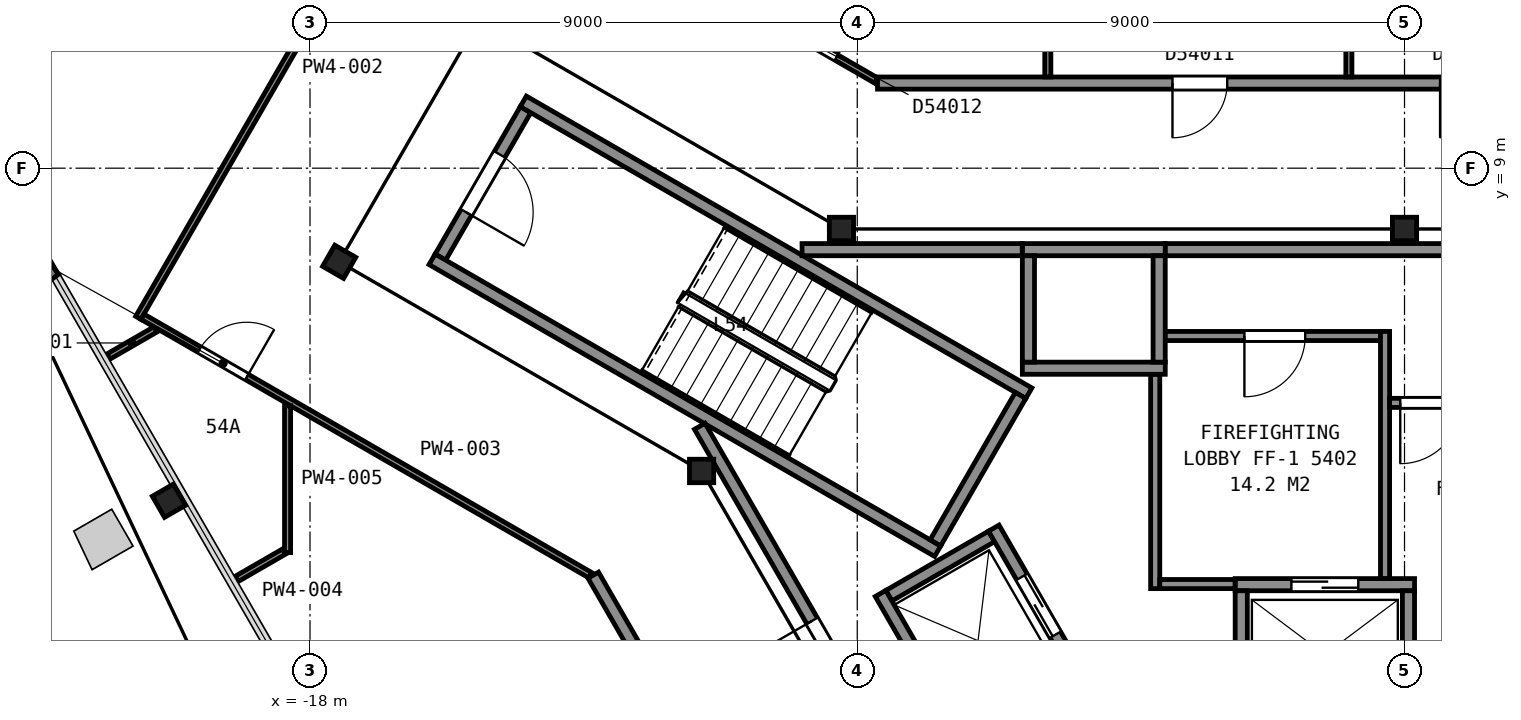
"""IFC4 building model, lengths in metres.
Left out: names, types, materials, properties, quantities, classifications, styles, units other than length and angle.
Written with IfcOpenShell. Run it as: python <this file> out.ifc"""

import sys

from ifc_helpers import new_model, si_unit, direction, frame, frame_2d, origin, origin_2d, place, context, subcontext, project, spatial, rectangle, i_section, extrude, element, fill, save


model = new_model("IFC4")
c1 = context("Model", 3, precision=1e-05, world=origin(), true_north=direction((0.0, 1.0)))
c2 = subcontext(c1, "Body", "Model", "MODEL_VIEW")
j1 = project(units=[si_unit("LENGTHUNIT", "METRE"), si_unit("PLANEANGLEUNIT", "RADIAN")], contexts=[c1])
p1 = place(None, origin())
s1 = spatial("IfcSite", under=j1, at=p1, CompositionType="ELEMENT")
p2 = place(p1, origin())
s2 = spatial("IfcBuilding", under=s1, at=p2, CompositionType="ELEMENT")
p3 = place(p2, frame((0.0, 0.0, 217.5)))
s3 = spatial("IfcBuildingStorey", under=s2, at=p3, CompositionType="ELEMENT", Elevation=217.5)
p4 = place(p3, frame((-20.32, 3.53, 0.04), z_axis=(0.0, 0.0, 1.0), x_axis=(-0.5, 0.866025403784, 0.0)))
e1 = element("IfcColumn", 1, at=p4, inside=s3, PredefinedType="COLUMN", context=c2, shape_type="SweptSolid", body=[
    extrude(i_section(OverallWidth=0.401, OverallDepth=0.399, WebThickness=0.025, FlangeThickness=0.04, FilletRadius=0.015, at=origin_2d()), origin(), (0.0, 0.0, 1.0), 3.66),
])
for number, where, z_axis, x_axis in (
    (2, (0.0, 8.0, 0.0), (0.0, 0.0, 1.0), (1.0, 0.0, 0.0)),
    (3, (-9.26, 8.0, 0.0), (0.0, 0.0, 1.0), (1.0, 0.0, 0.0)),
):
    element("IfcColumn", number, at=place(p3, frame(where, z_axis=z_axis, x_axis=x_axis)), inside=s3, PredefinedType="COLUMN", context=c2, shape_type="SweptSolid", body=[
        extrude(i_section(OverallWidth=0.399, OverallDepth=0.386, WebThickness=0.021, FlangeThickness=0.033, FilletRadius=0.015, at=origin_2d()), origin(), (0.0, 0.0, 1.0), 3.7),
    ])
p5 = place(p3, frame((-17.52, 7.46, 0.0), z_axis=(0.0, 0.0, 1.0), x_axis=(0.5, 0.866025403784, 0.0)))
e4 = element("IfcColumn", 4, at=p5, inside=s3, PredefinedType="COLUMN", context=c2, shape_type="SweptSolid", body=[
    extrude(i_section(OverallWidth=0.401, OverallDepth=0.399, WebThickness=0.025, FlangeThickness=0.04, FilletRadius=0.015, at=origin_2d()), origin(), (0.0, 0.0, 1.0), 3.7),
])
p6 = place(p3, frame((-11.56, 4.02, 0.0), z_axis=(0.0, 0.0, 1.0), x_axis=(1.0, 0.0, 0.0)))
e5 = element("IfcColumn", 5, at=p6, inside=s3, PredefinedType="COLUMN", context=c2, shape_type="SweptSolid", body=[
    extrude(i_section(OverallWidth=0.399, OverallDepth=0.386, WebThickness=0.021, FlangeThickness=0.033, FilletRadius=0.015, at=origin_2d()), origin(), (0.0, 0.0, 1.0), 3.7),
])
p7 = place(p3, frame((-14.455, 9.962, 0.0), z_axis=(0.0, 0.0, 1.0), x_axis=(-0.500049511043, -0.865996816683, 0.0)))
e6 = element("IfcWall", 6, at=p7, inside=s3, PredefinedType="PARTITIONING", context=c2, shape_type="SweptSolid", body=[
    extrude(rectangle(XDim=2.8, YDim=0.2, at=frame_2d((1.4, 0.0))), origin(), (0.0, 0.0, 1.0), 3.45),
])
p8 = place(p7, frame((0.85, 0.0, 0.0)))
e7 = element("IfcOpeningElement", 7, at=p8, cuts=e6, PredefinedType="OPENING", context=c2, shape_type="SweptSolid", body=[
    extrude(rectangle(XDim=1.1, YDim=2.1, at=frame_2d((0.55, 1.05))), frame((0.0, 0.11, 0.0), z_axis=(0.0, -1.0, 0.0), x_axis=(1.0, 0.0, 0.0)), (0.0, 0.0, 1.0), 0.22),
])
for number, where, z_axis, x_axis in (
    (8, (-7.678, 2.701, 0.0), (0.0, 0.0, 1.0), (-0.866, 0.5, 0.0)),
    (9, (-6.178, 5.299, 0.0), (0.0, 0.0, 1.0), (-0.866, 0.5, 0.0)),
):
    element("IfcWall", number, at=place(p3, frame(where, z_axis=z_axis, x_axis=x_axis)), inside=s3, PredefinedType="PARTITIONING", context=c2, shape_type="SweptSolid", body=[
        extrude(rectangle(XDim=9.6, YDim=0.2, at=frame_2d((4.8, 0.0))), origin(), (0.0, 0.0, 1.0), 3.45),
    ])
p9 = place(p3, frame((-6.315, 5.262, 0.0), z_axis=(0.0, 0.0, 1.0), x_axis=(-0.500049511043, -0.865996816683, 0.0)))
e10 = element("IfcWall", 10, at=p9, inside=s3, PredefinedType="PARTITIONING", context=c2, shape_type="SweptSolid", body=[
    extrude(rectangle(XDim=2.8, YDim=0.2, at=frame_2d((1.4, 0.0))), origin(), (0.0, 0.0, 1.0), 3.45),
])
p10 = place(p3, frame((-2.785, 2.15, 0.0), z_axis=(0.0, 0.0, 1.0), x_axis=(1.0, 0.0, 0.0)))
e11 = element("IfcWall", 11, at=p10, inside=s3, PredefinedType="PARTITIONING", context=c2, shape_type="SweptSolid", body=[
    extrude(rectangle(XDim=2.95, YDim=0.2, at=frame_2d((1.475, 0.0))), origin(), (0.0, 0.0, 1.0), 3.7),
])
p11 = place(p10, frame((0.925, 0.0, 0.0)))
e12 = element("IfcOpeningElement", 12, at=p11, cuts=e11, PredefinedType="OPENING", context=c2, shape_type="SweptSolid", body=[
    extrude(rectangle(XDim=1.1, YDim=2.1, at=frame_2d((0.55, 1.05))), frame((0.0, 0.11, 0.0), z_axis=(0.0, -1.0, 0.0), x_axis=(1.0, 0.0, 0.0)), (0.0, 0.0, 1.0), 0.22),
])
for number, where, z_axis, x_axis in (
    (13, (-6.285, 5.71, 0.0), (0.0, 0.0, 1.0), (1.0, 0.0, 0.0)),
    (14, (-6.285, 7.66, 0.0), (0.0, 0.0, 1.0), (1.0, 0.0, 0.0)),
):
    element("IfcWall", number, at=place(p3, frame(where, z_axis=z_axis, x_axis=x_axis)), inside=s3, PredefinedType="PARTITIONING", context=c2, shape_type="SweptSolid", body=[
        extrude(rectangle(XDim=2.35, YDim=0.2, at=frame_2d((1.175, 0.0))), origin(), (0.0, 0.0, 1.0), 3.7),
    ])
for number, where, z_axis, x_axis in (
    (15, (-8.48, 1.969, 0.0), (0.0, 0.0, 1.0), (0.866, 0.5, 0.0)),
    (16, (0.065, 0.1, 0.0), (0.0, 0.0, 1.0), (0.0, 1.0, 0.0)),
    (17, (-2.685, 0.1, 0.0), (0.0, 0.0, 1.0), (0.0, 1.0, 0.0)),
):
    element("IfcWall", number, at=place(p3, frame(where, z_axis=z_axis, x_axis=x_axis)), inside=s3, PredefinedType="PARTITIONING", context=c2, shape_type="SweptSolid", body=[
        extrude(rectangle(XDim=1.95, YDim=0.2, at=frame_2d((0.975, 0.0))), origin(), (0.0, 0.0, 1.0), 3.7),
    ])
for number, where, z_axis, x_axis in (
    (18, (-4.035, 5.81, 0.0), (0.0, 0.0, 1.0), (0.0, 1.0, 0.0)),
    (19, (-6.185, 5.81, 0.0), (0.0, 0.0, 1.0), (0.0, 1.0, 0.0)),
):
    element("IfcWall", number, at=place(p3, frame(where, z_axis=z_axis, x_axis=x_axis)), inside=s3, PredefinedType="PARTITIONING", context=c2, shape_type="SweptSolid", body=[
        extrude(rectangle(XDim=1.75, YDim=0.2, at=frame_2d((0.875, 0.0))), origin(), (0.0, 0.0, 1.0), 3.7),
    ])
p12 = place(p3, frame((-5.28, 0.525, 0.0), z_axis=(0.0, 0.0, 1.0), x_axis=(-0.500037662692, 0.866003658127, 0.0)))
e20 = element("IfcWall", 20, at=p12, inside=s3, PredefinedType="PARTITIONING", context=c2, shape_type="SweptSolid", body=[
    extrude(rectangle(XDim=2.95, YDim=0.2, at=frame_2d((1.475, 0.0))), origin(), (0.0, 0.0, 1.0), 3.7),
])
p13 = place(p12, frame((0.925, 0.0, 0.0)))
e21 = element("IfcOpeningElement", 21, at=p13, cuts=e20, PredefinedType="OPENING", context=c2, shape_type="SweptSolid", body=[
    extrude(rectangle(XDim=1.1, YDim=2.1, at=frame_2d((0.55, 1.05))), frame((0.0, 0.11, 0.0), z_axis=(0.0, -1.0, 0.0), x_axis=(1.0, 0.0, 0.0)), (0.0, 0.0, 1.0), 0.22),
])
p14 = place(p3, frame((-7.242, -0.376, 0.0), z_axis=(0.0, 0.0, 1.0), x_axis=(-0.499996545922, 0.866027397988, 0.0)))
e22 = element("IfcWall", 22, at=p14, inside=s3, PredefinedType="PARTITIONING", context=c2, shape_type="SweptSolid", body=[
    extrude(rectangle(XDim=2.75, YDim=0.2, at=frame_2d((1.375, 0.0))), origin(), (0.0, 0.0, 1.0), 3.7),
])
p15 = place(p3, frame((-11.591, 4.755, 0.0), z_axis=(0.0, 0.0, 1.0), x_axis=(0.500043977787, -0.866000011708, 0.0)))
e23 = element("IfcWall", 23, at=p15, inside=s3, PredefinedType="PARTITIONING", context=c2, shape_type="SweptSolid", body=[
    extrude(rectangle(XDim=6.617, YDim=0.2, at=frame_2d((3.308, 0.0))), origin(), (0.0, 0.0, 1.0), 3.45),
])
p16 = place(p15, frame((3.695, 0.0, 0.0)))
e24 = element("IfcOpeningElement", 24, at=p16, cuts=e23, PredefinedType="OPENING", context=c2, shape_type="SweptSolid", body=[
    extrude(rectangle(XDim=1.8, YDim=2.1, at=frame_2d((0.9, 1.05))), frame((0.0, 0.11, 0.0), z_axis=(0.0, -1.0, 0.0), x_axis=(1.0, 0.0, 0.0)), (0.0, 0.0, 1.0), 0.22),
])
p17 = place(p3, frame((-9.908, 7.66, 0.0), z_axis=(0.0, 0.0, 1.0), x_axis=(1.0, 0.0, 0.0)))
e25 = element("IfcWall", 25, at=p17, inside=s3, PredefinedType="PARTITIONING", context=c2, shape_type="SweptSolid", body=[
    extrude(rectangle(XDim=3.621, YDim=0.2, at=frame_2d((1.811, 0.0))), origin(), (0.0, 0.0, 1.0), 3.45),
])
p18 = place(p3, frame((-4.1, 2.085, 0.0), z_axis=(0.0, 0.0, 1.0), x_axis=(0.0, 1.0, 0.0)))
e26 = element("IfcWall", 26, at=p18, inside=s3, PredefinedType="PARTITIONING", context=c2, shape_type="SweptSolid", body=[
    extrude(rectangle(XDim=3.523, YDim=0.15, at=frame_2d((1.761, 0.0))), origin(), (0.0, 0.0, 1.0), 3.45),
])
p19 = place(p3, frame((-4.025, 2.16, 0.0), z_axis=(0.0, 0.0, 1.0), x_axis=(1.0, 0.0, 0.0)))
e27 = element("IfcWall", 27, at=p19, inside=s3, PredefinedType="PARTITIONING", context=c2, shape_type="SweptSolid", body=[
    extrude(rectangle(XDim=1.238, YDim=0.15, at=frame_2d((0.619, 0.0))), origin(), (0.0, 0.0, 1.0), 3.45),
])
p20 = place(p3, frame((-3.933, 6.24, 0.0), z_axis=(0.0, 0.0, 1.0), x_axis=(1.0, 0.0, 0.0)))
e28 = element("IfcWall", 28, at=p20, inside=s3, PredefinedType="PARTITIONING", context=c2, shape_type="SweptSolid", body=[
    extrude(rectangle(XDim=3.538, YDim=0.15, at=frame_2d((1.769, 0.0))), origin(), (0.0, 0.0, 1.0), 3.45),
])
p21 = place(p20, frame((1.3, 0.0, 0.0)))
e29 = element("IfcOpeningElement", 29, at=p21, cuts=e28, PredefinedType="OPENING", context=c2, shape_type="SweptSolid", body=[
    extrude(rectangle(XDim=1.0, YDim=2.1, at=frame_2d((0.5, 1.05))), frame((0.0, 0.085, 0.0), z_axis=(0.0, -1.0, 0.0), x_axis=(1.0, 0.0, 0.0)), (0.0, 0.0, 1.0), 0.17),
])
p22 = place(p3, frame((-3.933, 7.66, 0.0), z_axis=(0.0, 0.0, 1.0), x_axis=(1.0, 0.0, 0.0)))
e30 = element("IfcWall", 30, at=p22, inside=s3, PredefinedType="PARTITIONING", context=c2, shape_type="SweptSolid", body=[
    extrude(rectangle(XDim=13.841, YDim=0.2, at=frame_2d((6.92, 0.0))), origin(), (0.0, 0.0, 1.0), 3.45),
])
p23 = place(p3, frame((-0.32, 2.252, 0.0), z_axis=(0.0, 0.0, 1.0), x_axis=(0.0, 1.0, 0.0)))
e31 = element("IfcWall", 31, at=p23, inside=s3, PredefinedType="PARTITIONING", context=c2, shape_type="SweptSolid", body=[
    extrude(rectangle(XDim=4.063, YDim=0.15, at=frame_2d((2.031, 0.0))), origin(), (0.0, 0.0, 1.0), 3.45),
])
p24 = place(p3, frame((-0.245, 5.14, 0.0), z_axis=(0.0, 0.0, 1.0), x_axis=(1.0, 0.0, 0.0)))
e32 = element("IfcWall", 32, at=p24, inside=s3, PredefinedType="PARTITIONING", context=c2, shape_type="SweptSolid", body=[
    extrude(rectangle(XDim=5.11, YDim=0.15, at=frame_2d((2.555, 0.0))), origin(), (0.0, 0.0, 1.0), 3.45),
])
p25 = place(p24, frame((0.175, 0.0, 0.0)))
e33 = element("IfcOpeningElement", 33, at=p25, cuts=e32, PredefinedType="OPENING", context=c2, shape_type="SweptSolid", body=[
    extrude(rectangle(XDim=1.0, YDim=2.1, at=frame_2d((0.5, 1.05))), frame((0.0, 0.085, 0.0), z_axis=(0.0, -1.0, 0.0), x_axis=(1.0, 0.0, 0.0)), (0.0, 0.0, 1.0), 0.17),
])
p26 = place(p3, frame((-21.313, 5.903, 0.0), z_axis=(0.0, 0.0, 1.0), x_axis=(0.865952303503, 0.500126592033, 0.0)))
e34 = element("IfcWall", 34, at=p26, inside=s3, PredefinedType="PARTITIONING", context=c2, shape_type="SweptSolid", body=[
    extrude(rectangle(XDim=0.889, YDim=0.1, at=frame_2d((0.444, 0.0))), origin(), (0.0, 0.0, 1.0), 2.713),
])
p27 = place(p3, frame((-20.824, 6.539, 0.0), z_axis=(0.0, 0.0, 1.0), x_axis=(0.500297300687, 0.865853689098, 0.0)))
e35 = element("IfcWall", 35, at=p27, inside=s3, PredefinedType="PARTITIONING", context=c2, shape_type="SweptSolid", body=[
    extrude(rectangle(XDim=9.496, YDim=0.1, at=frame_2d((4.748, 0.0))), origin(), (0.0, 0.0, 1.0), 2.713),
])
p28 = place(p3, frame((-13.391, 2.305, 0.0), z_axis=(0.0, 0.0, 1.0), x_axis=(-0.86606177021, 0.499937006213, 0.0)))
e36 = element("IfcWall", 36, at=p28, inside=s3, PredefinedType="PARTITIONING", context=c2, shape_type="SweptSolid", body=[
    extrude(rectangle(XDim=8.504, YDim=0.1, at=frame_2d((4.252, 0.0))), origin(), (0.0, 0.0, 1.0), 2.713),
])
p29 = place(p28, frame((6.522, 0.0, 0.0)))
e37 = element("IfcOpeningElement", 37, at=p29, cuts=e36, PredefinedType="OPENING", context=c2, shape_type="SweptSolid", body=[
    extrude(rectangle(XDim=0.9, YDim=2.1, at=frame_2d((0.45, 1.05))), frame((0.0, 0.06, 0.0), z_axis=(0.0, -1.0, 0.0), x_axis=(1.0, 0.0, 0.0)), (0.0, 0.0, 1.0), 0.12),
])
p30 = place(p3, frame((-19.202, 2.247, 0.0), z_axis=(0.0, 0.0, 1.0), x_axis=(0.86604424267, 0.499967368674, 0.0)))
e38 = element("IfcWall", 38, at=p30, inside=s3, PredefinedType="PARTITIONING", context=c2, shape_type="SweptSolid", body=[
    extrude(rectangle(XDim=0.892, YDim=0.1, at=frame_2d((0.446, 0.0))), origin(), (0.0, 0.0, 1.0), 2.713),
])
p31 = place(p3, frame((-18.369, 2.678, 0.0), z_axis=(0.0, 0.0, 1.0), x_axis=(0.0, 1.0, 0.0)))
e39 = element("IfcWall", 39, at=p31, inside=s3, PredefinedType="PARTITIONING", context=c2, shape_type="SweptSolid", body=[
    extrude(rectangle(XDim=2.414, YDim=0.1, at=frame_2d((1.207, 0.0))), origin(), (0.0, 0.0, 1.0), 2.713),
])
p32 = place(p3, frame((-16.055, 14.693, 0.0), z_axis=(0.0, 0.0, 1.0), x_axis=(0.866070360466, -0.499922124658, 0.0)))
e40 = element("IfcWall", 40, at=p32, inside=s3, PredefinedType="PARTITIONING", context=c2, shape_type="SweptSolid", body=[
    extrude(rectangle(XDim=8.503, YDim=0.1, at=frame_2d((4.251, 0.0))), origin(), (0.0, 0.0, 1.0), 2.713),
])
p33 = place(p32, frame((6.847, 0.0, 0.0)))
e41 = element("IfcOpeningElement", 41, at=p33, cuts=e40, PredefinedType="OPENING", context=c2, shape_type="SweptSolid", body=[
    extrude(rectangle(XDim=0.9, YDim=2.1, at=frame_2d((0.45, 1.05))), frame((0.0, 0.06, 0.0), z_axis=(0.0, -1.0, 0.0), x_axis=(1.0, 0.0, 0.0)), (0.0, 0.0, 1.0), 0.12),
])
p34 = place(p32, frame((2.55, 0.0, 0.0)))
e42 = element("IfcOpeningElement", 42, at=p34, cuts=e40, PredefinedType="OPENING", context=c2, shape_type="SweptSolid", body=[
    extrude(rectangle(XDim=0.9, YDim=2.1, at=frame_2d((0.45, 1.05))), frame((0.0, 0.06, 0.0), z_axis=(0.0, -1.0, 0.0), x_axis=(1.0, 0.0, 0.0)), (0.0, 0.0, 1.0), 0.12),
])
p35 = place(p3, frame((-4.675, -12.706, 0.0), z_axis=(0.0, 0.0, 1.0), x_axis=(-0.49997440863, 0.866040178465, 0.0)))
e43 = element("IfcWall", 43, at=p35, inside=s3, PredefinedType="PARTITIONING", context=c2, shape_type="SweptSolid", body=[
    extrude(rectangle(XDim=17.335, YDim=0.2, at=frame_2d((8.667, 0.0))), origin(), (0.0, 0.0, 1.0), 2.713),
])
p36 = place(p35, frame((14.185, 0.0, 0.0)))
e44 = element("IfcOpeningElement", 44, at=p36, cuts=e43, PredefinedType="OPENING", context=c2, shape_type="SweptSolid", body=[
    extrude(rectangle(XDim=0.9, YDim=2.1, at=frame_2d((0.45, 1.05))), frame((0.0, 0.11, 0.0), z_axis=(0.0, -1.0, 0.0), x_axis=(1.0, 0.0, 0.0)), (0.0, 0.0, 1.0), 0.22),
])
p37 = place(p35, frame((6.895, 0.0, 0.0)))
e45 = element("IfcOpeningElement", 45, at=p37, cuts=e43, PredefinedType="OPENING", context=c2, shape_type="SweptSolid", body=[
    extrude(rectangle(XDim=0.9, YDim=2.1, at=frame_2d((0.45, 1.05))), frame((0.0, 0.11, 0.0), z_axis=(0.0, -1.0, 0.0), x_axis=(1.0, 0.0, 0.0)), (0.0, 0.0, 1.0), 0.22),
])
p38 = place(p35, frame((1.979, 0.0, 0.0)))
e46 = element("IfcOpeningElement", 46, at=p38, cuts=e43, PredefinedType="OPENING", context=c2, shape_type="SweptSolid", body=[
    extrude(rectangle(XDim=0.9, YDim=2.1, at=frame_2d((0.45, 1.05))), frame((0.0, 0.11, 0.0), z_axis=(0.0, -1.0, 0.0), x_axis=(1.0, 0.0, 0.0)), (0.0, 0.0, 1.0), 0.22),
])
p39 = place(p3, frame((-8.667, 10.4, 0.0), z_axis=(0.0, 0.0, 1.0), x_axis=(1.0, 0.0, 0.0)))
e47 = element("IfcWall", 47, at=p39, inside=s3, PredefinedType="PARTITIONING", context=c2, shape_type="SweptSolid", body=[
    extrude(rectangle(XDim=17.334, YDim=0.2, at=frame_2d((8.667, 0.0))), origin(), (0.0, 0.0, 1.0), 2.713),
])
p40 = place(p39, frame((9.252, 0.0, 0.0)))
e48 = element("IfcOpeningElement", 48, at=p40, cuts=e47, PredefinedType="OPENING", context=c2, shape_type="SweptSolid", body=[
    extrude(rectangle(XDim=0.9, YDim=2.1, at=frame_2d((0.45, 1.05))), frame((0.0, 0.11, 0.0), z_axis=(0.0, -1.0, 0.0), x_axis=(1.0, 0.0, 0.0)), (0.0, 0.0, 1.0), 0.22),
])
p41 = place(p39, frame((4.851, 0.0, 0.0)))
e49 = element("IfcOpeningElement", 49, at=p41, cuts=e47, PredefinedType="OPENING", context=c2, shape_type="SweptSolid", body=[
    extrude(rectangle(XDim=0.9, YDim=2.1, at=frame_2d((0.45, 1.05))), frame((0.0, 0.11, 0.0), z_axis=(0.0, -1.0, 0.0), x_axis=(1.0, 0.0, 0.0)), (0.0, 0.0, 1.0), 0.22),
])
for number, where, z_axis, x_axis in (
    (50, (-5.866, 10.5, 0.0), (0.0, 0.0, 1.0), (0.0, 1.0, 0.0)),
    (51, (-0.915, 10.5, 0.0), (0.0, 0.0, 1.0), (0.0, 1.0, 0.0)),
):
    element("IfcWall", number, at=place(p3, frame(where, z_axis=z_axis, x_axis=x_axis)), inside=s3, PredefinedType="PARTITIONING", context=c2, shape_type="SweptSolid", body=[
        extrude(rectangle(XDim=5.006, YDim=0.1, at=frame_2d((2.503, 0.0))), origin(), (0.0, 0.0, 1.0), 2.713),
    ])
p42 = place(p8, origin())
e52 = element("IfcDoor", 52, at=p42, inside=s3, OperationType="SINGLE_SWING_RIGHT", PredefinedType="DOOR", context=c2, shape_type="SweptSolid", body=[
    extrude(rectangle(XDim=1.1, YDim=2.1, at=frame_2d((0.55, 1.05))), frame((0.0, 0.025, 0.0), z_axis=(0.0, -1.0, 0.0), x_axis=(1.0, 0.0, 0.0)), (0.0, 0.0, 1.0), 0.05),
])
fill(e7, e52)
p43 = place(p11, origin())
e53 = element("IfcDoor", 53, at=p43, inside=s3, OperationType="SLIDING_TO_LEFT", PredefinedType="DOOR", context=c2, shape_type="SweptSolid", body=[
    extrude(rectangle(XDim=1.1, YDim=2.1, at=frame_2d((0.55, 1.05))), frame((0.0, 0.025, 0.0), z_axis=(0.0, -1.0, 0.0), x_axis=(1.0, 0.0, 0.0)), (0.0, 0.0, 1.0), 0.05),
])
fill(e12, e53)
p44 = place(p13, origin())
e54 = element("IfcDoor", 54, at=p44, inside=s3, OperationType="SLIDING_TO_LEFT", PredefinedType="DOOR", context=c2, shape_type="SweptSolid", body=[
    extrude(rectangle(XDim=1.1, YDim=2.1, at=frame_2d((0.55, 1.05))), frame((0.0, 0.025, 0.0), z_axis=(0.0, -1.0, 0.0), x_axis=(1.0, 0.0, 0.0)), (0.0, 0.0, 1.0), 0.05),
])
fill(e21, e54)
p45 = place(p16, origin())
e55 = element("IfcDoor", 55, at=p45, inside=s3, OperationType="DOUBLE_DOOR_SINGLE_SWING", PredefinedType="DOOR", context=c2, shape_type="SweptSolid", body=[
    extrude(rectangle(XDim=1.8, YDim=2.1, at=frame_2d((0.9, 1.05))), frame((0.0, 0.025, 0.0), z_axis=(0.0, -1.0, 0.0), x_axis=(1.0, 0.0, 0.0)), (0.0, 0.0, 1.0), 0.05),
])
fill(e24, e55)
p46 = place(p21, origin())
e56 = element("IfcDoor", 56, at=p46, inside=s3, OperationType="SINGLE_SWING_LEFT", PredefinedType="DOOR", context=c2, shape_type="SweptSolid", body=[
    extrude(rectangle(XDim=1.0, YDim=2.1, at=frame_2d((0.5, 1.05))), frame((0.0, 0.025, 0.0), z_axis=(0.0, -1.0, 0.0), x_axis=(1.0, 0.0, 0.0)), (0.0, 0.0, 1.0), 0.05),
])
fill(e29, e56)
p47 = place(p25, origin())
e57 = element("IfcDoor", 57, at=p47, inside=s3, OperationType="SINGLE_SWING_LEFT", PredefinedType="DOOR", context=c2, shape_type="SweptSolid", body=[
    extrude(rectangle(XDim=1.0, YDim=2.1, at=frame_2d((0.5, 1.05))), frame((0.0, 0.025, 0.0), z_axis=(0.0, -1.0, 0.0), x_axis=(1.0, 0.0, 0.0)), (0.0, 0.0, 1.0), 0.05),
])
fill(e33, e57)
p48 = place(p29, origin())
e58 = element("IfcDoor", 58, at=p48, inside=s3, OperationType="SINGLE_SWING_LEFT", PredefinedType="DOOR", context=c2, shape_type="SweptSolid", body=[
    extrude(rectangle(XDim=0.9, YDim=2.1, at=frame_2d((0.45, 1.05))), frame((0.0, 0.025, 0.0), z_axis=(0.0, -1.0, 0.0), x_axis=(1.0, 0.0, 0.0)), (0.0, 0.0, 1.0), 0.05),
])
fill(e37, e58)
p49 = place(p33, origin())
e59 = element("IfcDoor", 59, at=p49, inside=s3, OperationType="SINGLE_SWING_RIGHT", PredefinedType="DOOR", context=c2, shape_type="SweptSolid", body=[
    extrude(rectangle(XDim=0.9, YDim=2.1, at=frame_2d((0.45, 1.05))), frame((0.0, 0.025, 0.0), z_axis=(0.0, -1.0, 0.0), x_axis=(1.0, 0.0, 0.0)), (0.0, 0.0, 1.0), 0.05),
])
fill(e41, e59)
p50 = place(p40, origin())
e60 = element("IfcDoor", 60, at=p50, inside=s3, OperationType="SINGLE_SWING_LEFT", PredefinedType="DOOR", context=c2, shape_type="SweptSolid", body=[
    extrude(rectangle(XDim=0.9, YDim=2.1, at=frame_2d((0.45, 1.05))), frame((0.0, 0.025, 0.0), z_axis=(0.0, -1.0, 0.0), x_axis=(1.0, 0.0, 0.0)), (0.0, 0.0, 1.0), 0.05),
])
fill(e48, e60)
p51 = place(p41, origin())
e61 = element("IfcDoor", 61, at=p51, inside=s3, OperationType="SINGLE_SWING_LEFT", PredefinedType="DOOR", context=c2, shape_type="SweptSolid", body=[
    extrude(rectangle(XDim=0.9, YDim=2.1, at=frame_2d((0.45, 1.05))), frame((0.0, 0.025, 0.0), z_axis=(0.0, -1.0, 0.0), x_axis=(1.0, 0.0, 0.0)), (0.0, 0.0, 1.0), 0.05),
])
fill(e49, e61)
save(model, sys.argv[1])
